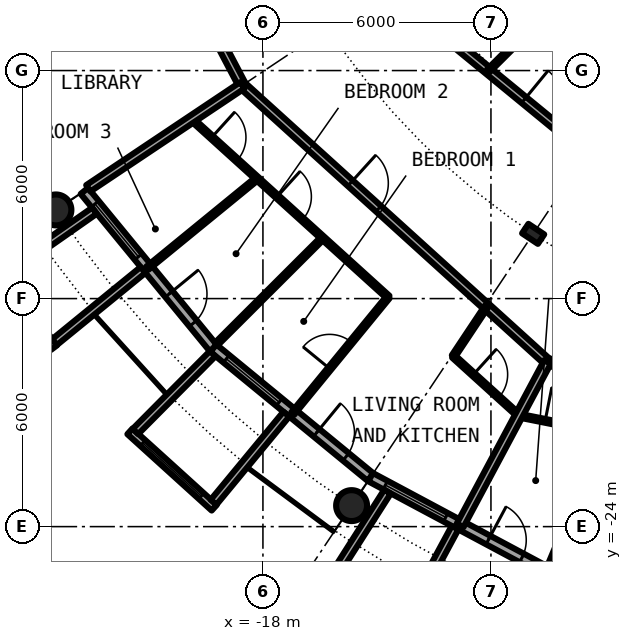
"""IFC4 building model, lengths in metres.
Left out: names, types, materials, properties, quantities, classifications, styles, units other than length and angle.
Written with IfcOpenShell. Run it as: python <this file> out.ifc"""

import sys

from ifc_helpers import new_model, si_unit, direction, frame, frame_2d, origin, origin_2d, place, context, subcontext, project, spatial, rectangle, circle, hollow_circle, i_section, extrude, element, fill, save


model = new_model("IFC4")
c1 = context("Model", 3, precision=1e-05, world=origin(), true_north=direction((0.0, 1.0)))
c2 = subcontext(c1, "Body", "Model", "MODEL_VIEW")
j1 = project(units=[si_unit("LENGTHUNIT", "METRE"), si_unit("PLANEANGLEUNIT", "RADIAN")], contexts=[c1])
p1 = place(None, origin())
s1 = spatial("IfcSite", under=j1, at=p1, CompositionType="ELEMENT")
p2 = place(p1, origin())
s2 = spatial("IfcBuilding", under=s1, at=p2, CompositionType="ELEMENT")
p3 = place(p2, frame((0.0, 0.0, 151.3)))
s3 = spatial("IfcBuildingStorey", under=s2, at=p3, CompositionType="ELEMENT", Elevation=151.3)
for number, where, z_axis, x_axis in (
    (1, (-23.448, -15.667, 0.0), (0.0, 0.0, 1.0), (1.0, 0.0, 0.0)),
    (2, (-15.667, -23.448, 0.0), (0.0, 0.0, 1.0), (1.0, 0.0, 0.0)),
):
    element("IfcColumn", number, at=place(p3, frame(where, z_axis=z_axis, x_axis=x_axis)), inside=s3, PredefinedType="COLUMN", context=c2, shape_type="SweptSolid", body=[
        extrude(hollow_circle(Radius=0.406, WallThickness=0.04, at=origin_2d()), origin(), (0.0, 0.0, 1.0), 3.05),
    ])
p4 = place(p3, frame((-10.889, -16.297, 0.0), z_axis=(0.0, 0.0, 1.0), x_axis=(-0.55557023302, -0.831469612303, 0.0)))
e3 = element("IfcColumn", 3, at=p4, inside=s3, PredefinedType="COLUMN", context=c2, shape_type="SweptSolid", body=[
    extrude(i_section(OverallWidth=0.3, OverallDepth=0.5, WebThickness=0.014, FlangeThickness=0.028, FilletRadius=0.027, at=origin_2d()), origin(), (0.0, 0.0, 1.0), 3.05),
])
p5 = place(p3, frame((-22.699, -15.167, 0.0), z_axis=(0.0, 0.0, 1.0), x_axis=(0.634382322723, -0.773019449054, 0.0)))
e4 = element("IfcWall", 4, at=p5, inside=s3, PredefinedType="SOLIDWALL", context=c2, shape_type="SweptSolid", body=[
    extrude(rectangle(XDim=5.352, YDim=0.25, at=frame_2d((2.676, 0.0))), origin(), (0.0, 0.0, 1.0), 2.7),
])
p6 = place(p5, frame((0.441, 0.0, 0.3)))
e5 = element("IfcOpeningElement", 5, at=p6, cuts=e4, PredefinedType="OPENING", context=c2, shape_type="SweptSolid", body=[
    extrude(rectangle(XDim=1.8, YDim=2.1, at=frame_2d((0.9, 1.05))), frame((0.0, 0.135, 0.0), z_axis=(0.0, -1.0, 0.0), x_axis=(1.0, 0.0, 0.0)), (0.0, 0.0, 1.0), 0.27),
])
p7 = place(p5, frame((3.51, 0.0, 0.0)))
e6 = element("IfcOpeningElement", 6, at=p7, cuts=e4, PredefinedType="OPENING", context=c2, shape_type="SweptSolid", body=[
    extrude(rectangle(XDim=1.0, YDim=2.2, at=frame_2d((0.5, 1.1))), frame((0.0, 0.135, 0.0), z_axis=(0.0, -1.0, 0.0), x_axis=(1.0, 0.0, 0.0)), (0.0, 0.0, 1.0), 0.27),
])
p8 = place(p3, frame((-24.972, -17.337, -0.03), z_axis=(0.0, 0.0, 1.0), x_axis=(0.602806268067, -0.797887588059, 0.0)))
e7 = element("IfcWall", 7, at=p8, inside=s3, PredefinedType="SOLIDWALL", context=c2, shape_type="SweptSolid", body=[
    extrude(rectangle(XDim=2.447, YDim=0.2, at=frame_2d((1.223, 0.0))), origin(), (0.0, 0.0, 1.0), 2.73),
])
p9 = place(p8, frame((0.183, 0.0, 0.33)))
e8 = element("IfcOpeningElement", 8, at=p9, cuts=e7, PredefinedType="OPENING", context=c2, shape_type="SweptSolid", body=[
    extrude(circle(Radius=1.04, at=frame_2d((1.04, 1.04))), frame((0.0, 0.11, 0.0), z_axis=(0.0, -1.0, 0.0), x_axis=(1.0, 0.0, 0.0)), (0.0, 0.0, 1.0), 0.22),
])
p10 = place(p3, frame((-22.433, -15.688, -0.03), z_axis=(0.0, 0.0, 1.0), x_axis=(-0.819373043115, -0.573260687834, 0.0)))
e9 = element("IfcWall", 9, at=p10, inside=s3, PredefinedType="SOLIDWALL", context=c2, shape_type="SweptSolid", body=[
    extrude(rectangle(XDim=2.925, YDim=0.2, at=frame_2d((1.463, 0.0))), origin(), (0.0, 0.0, 1.0), 2.73),
])
p11 = place(p3, frame((-21.155, -17.246, -0.03), z_axis=(0.0, 0.0, 1.0), x_axis=(-0.775179004516, -0.631741648902, 0.0)))
e10 = element("IfcWall", 10, at=p11, inside=s3, PredefinedType="SOLIDWALL", context=c2, shape_type="SweptSolid", body=[
    extrude(rectangle(XDim=3.006, YDim=0.2, at=frame_2d((1.503, 0.0))), origin(), (0.0, 0.0, 1.0), 2.73),
])
p12 = place(p3, frame((-19.304, -19.304, 0.0), z_axis=(0.0, 0.0, 1.0), x_axis=(0.773019449054, -0.634382322723, 0.0)))
e11 = element("IfcWall", 11, at=p12, inside=s3, PredefinedType="SOLIDWALL", context=c2, shape_type="SweptSolid", body=[
    extrude(rectangle(XDim=5.352, YDim=0.25, at=frame_2d((2.676, 0.0))), origin(), (0.0, 0.0, 1.0), 2.7),
])
p13 = place(p12, frame((0.441, 0.0, 0.3)))
e12 = element("IfcOpeningElement", 12, at=p13, cuts=e11, PredefinedType="OPENING", context=c2, shape_type="SweptSolid", body=[
    extrude(rectangle(XDim=1.8, YDim=2.1, at=frame_2d((0.9, 1.05))), frame((0.0, 0.135, 0.0), z_axis=(0.0, -1.0, 0.0), x_axis=(1.0, 0.0, 0.0)), (0.0, 0.0, 1.0), 0.27),
])
p14 = place(p12, frame((3.51, 0.0, 0.0)))
e13 = element("IfcOpeningElement", 13, at=p14, cuts=e11, PredefinedType="OPENING", context=c2, shape_type="SweptSolid", body=[
    extrude(rectangle(XDim=1.0, YDim=2.2, at=frame_2d((0.5, 1.1))), frame((0.0, 0.135, 0.0), z_axis=(0.0, -1.0, 0.0), x_axis=(1.0, 0.0, 0.0)), (0.0, 0.0, 1.0), 0.27),
])
p15 = place(p3, frame((-21.5, -21.493, -0.03), z_axis=(0.0, 0.0, 1.0), x_axis=(0.740998365753, -0.671506829416, 0.0)))
e14 = element("IfcWall", 14, at=p15, inside=s3, PredefinedType="SOLIDWALL", context=c2, shape_type="SweptSolid", body=[
    extrude(rectangle(XDim=2.993, YDim=0.2, at=frame_2d((1.497, 0.0))), origin(), (0.0, 0.0, 1.0), 2.73),
])
p16 = place(p15, frame((0.457, 0.0, 0.33)))
e15 = element("IfcOpeningElement", 15, at=p16, cuts=e14, PredefinedType="OPENING", context=c2, shape_type="SweptSolid", body=[
    extrude(circle(Radius=1.04, at=frame_2d((1.04, 1.04))), frame((0.0, 0.11, 0.0), z_axis=(0.0, -1.0, 0.0), x_axis=(1.0, 0.0, 0.0)), (0.0, 0.0, 1.0), 0.22),
])
p17 = place(p3, frame((-19.323, -19.45, -0.03), z_axis=(0.0, 0.0, 1.0), x_axis=(-0.704476739375, -0.709727076896, 0.0)))
e16 = element("IfcWall", 16, at=p17, inside=s3, PredefinedType="SOLIDWALL", context=c2, shape_type="SweptSolid", body=[
    extrude(rectangle(XDim=2.883, YDim=0.2, at=frame_2d((1.441, 0.0))), origin(), (0.0, 0.0, 1.0), 2.73),
])
p18 = place(p3, frame((-17.384, -21.041, -0.03), z_axis=(0.0, 0.0, 1.0), x_axis=(-0.63709551667, -0.770784861449, 0.0)))
e17 = element("IfcWall", 17, at=p18, inside=s3, PredefinedType="SOLIDWALL", context=c2, shape_type="SweptSolid", body=[
    extrude(rectangle(XDim=3.006, YDim=0.2, at=frame_2d((1.503, 0.0))), origin(), (0.0, 0.0, 1.0), 2.73),
])
p19 = place(p3, frame((-15.167, -22.699, 0.0), z_axis=(0.0, 0.0, 1.0), x_axis=(0.881915646801, -0.471407246368, 0.0)))
e18 = element("IfcWall", 18, at=p19, inside=s3, PredefinedType="SOLIDWALL", context=c2, shape_type="SweptSolid", body=[
    extrude(rectangle(XDim=5.352, YDim=0.25, at=frame_2d((2.676, 0.0))), origin(), (0.0, 0.0, 1.0), 2.7),
])
p20 = place(p19, frame((0.441, 0.0, 0.3)))
e19 = element("IfcOpeningElement", 19, at=p20, cuts=e18, PredefinedType="OPENING", context=c2, shape_type="SweptSolid", body=[
    extrude(rectangle(XDim=1.8, YDim=2.1, at=frame_2d((0.9, 1.05))), frame((0.0, 0.135, 0.0), z_axis=(0.0, -1.0, 0.0), x_axis=(1.0, 0.0, 0.0)), (0.0, 0.0, 1.0), 0.27),
])
p21 = place(p19, frame((3.51, 0.0, 0.0)))
e20 = element("IfcOpeningElement", 20, at=p21, cuts=e18, PredefinedType="OPENING", context=c2, shape_type="SweptSolid", body=[
    extrude(rectangle(XDim=1.0, YDim=2.2, at=frame_2d((0.5, 1.1))), frame((0.0, 0.135, 0.0), z_axis=(0.0, -1.0, 0.0), x_axis=(1.0, 0.0, 0.0)), (0.0, 0.0, 1.0), 0.27),
])
p22 = place(p3, frame((-14.722, -23.079, -0.03), z_axis=(0.0, 0.0, 1.0), x_axis=(-0.537572179146, -0.843217737129, 0.0)))
e21 = element("IfcWall", 21, at=p22, inside=s3, PredefinedType="SOLIDWALL", context=c2, shape_type="SweptSolid", body=[
    extrude(rectangle(XDim=2.924, YDim=0.2, at=frame_2d((1.462, 0.0))), origin(), (0.0, 0.0, 1.0), 2.73),
])
p23 = place(p3, frame((-12.945, -24.029, -0.03), z_axis=(0.0, 0.0, 1.0), x_axis=(-0.474424310775, -0.88029629861, 0.0)))
e22 = element("IfcWall", 22, at=p23, inside=s3, PredefinedType="SOLIDWALL", context=c2, shape_type="SweptSolid", body=[
    extrude(rectangle(XDim=3.006, YDim=0.2, at=frame_2d((1.503, 0.0))), origin(), (0.0, 0.0, 1.0), 2.73),
])
p24 = place(p3, frame((-19.869, -13.284, 0.0), z_axis=(0.0, 0.0, 1.0), x_axis=(0.741104058203, -0.67139018083, 0.0)))
e23 = element("IfcWall", 23, at=p24, inside=s3, PredefinedType="PARTITIONING", context=c2, shape_type="SweptSolid", body=[
    extrude(rectangle(XDim=6.969, YDim=0.1, at=frame_2d((3.484, 0.0))), origin(), (0.0, 0.0, 1.0), 2.7),
])
p25 = place(p24, frame((3.028, 0.0, 0.0)))
e24 = element("IfcOpeningElement", 24, at=p25, cuts=e23, PredefinedType="OPENING", context=c2, shape_type="SweptSolid", body=[
    extrude(rectangle(XDim=0.9, YDim=2.3, at=frame_2d((0.45, 1.15))), frame((0.0, 0.06, 0.0), z_axis=(0.0, -1.0, 0.0), x_axis=(1.0, 0.0, 0.0)), (0.0, 0.0, 1.0), 0.12),
])
p26 = place(p24, frame((0.705, 0.0, 0.0)))
e25 = element("IfcOpeningElement", 25, at=p26, cuts=e23, PredefinedType="OPENING", context=c2, shape_type="SweptSolid", body=[
    extrude(rectangle(XDim=0.9, YDim=2.3, at=frame_2d((0.45, 1.15))), frame((0.0, 0.06, 0.0), z_axis=(0.0, -1.0, 0.0), x_axis=(1.0, 0.0, 0.0)), (0.0, 0.0, 1.0), 0.12),
])
p27 = place(p3, frame((-12.988, -19.518, 0.0), z_axis=(0.0, 0.0, 1.0), x_axis=(0.741132356378, -0.671358942988, 0.0)))
e26 = element("IfcWall", 26, at=p27, inside=s3, PredefinedType="PARTITIONING", context=c2, shape_type="SweptSolid", body=[
    extrude(rectangle(XDim=2.323, YDim=0.1, at=frame_2d((1.162, 0.0))), origin(), (0.0, 0.0, 1.0), 2.7),
])
p28 = place(p27, frame((0.712, 0.0, 0.0)))
e27 = element("IfcOpeningElement", 27, at=p28, cuts=e26, PredefinedType="OPENING", context=c2, shape_type="SweptSolid", body=[
    extrude(rectangle(XDim=0.9, YDim=2.3, at=frame_2d((0.45, 1.15))), frame((0.0, 0.06, 0.0), z_axis=(0.0, -1.0, 0.0), x_axis=(1.0, 0.0, 0.0)), (0.0, 0.0, 1.0), 0.12),
])
p29 = place(p3, frame((-11.264, -21.08, 0.0), z_axis=(0.0, 0.0, 1.0), x_axis=(0.980795304313, -0.195039921651, 0.0)))
e28 = element("IfcWall", 28, at=p29, inside=s3, PredefinedType="PARTITIONING", context=c2, shape_type="SweptSolid", body=[
    extrude(rectangle(XDim=6.937, YDim=0.1, at=frame_2d((3.469, 0.0))), origin(), (0.0, 0.0, 1.0), 2.7),
])
p30 = place(p29, frame((3.016, 0.0, 0.0)))
e29 = element("IfcOpeningElement", 29, at=p30, cuts=e28, PredefinedType="OPENING", context=c2, shape_type="SweptSolid", body=[
    extrude(rectangle(XDim=0.9, YDim=2.3, at=frame_2d((0.45, 1.15))), frame((0.0, 0.06, 0.0), z_axis=(0.0, -1.0, 0.0), x_axis=(1.0, 0.0, 0.0)), (0.0, 0.0, 1.0), 0.12),
])
p31 = place(p29, frame((0.704, 0.0, 0.0)))
e30 = element("IfcOpeningElement", 30, at=p31, cuts=e28, PredefinedType="OPENING", context=c2, shape_type="SweptSolid", body=[
    extrude(rectangle(XDim=0.9, YDim=2.3, at=frame_2d((0.45, 1.15))), frame((0.0, 0.06, 0.0), z_axis=(0.0, -1.0, 0.0), x_axis=(1.0, 0.0, 0.0)), (0.0, 0.0, 1.0), 0.12),
])
p32 = place(p3, frame((-19.307, -10.935, 0.0), z_axis=(0.0, 0.0, 1.0), x_axis=(0.465605550524, -0.884992356646, 0.0)))
e31 = element("IfcWall", 31, at=p32, inside=s3, PredefinedType="PARTITIONING", context=c2, shape_type="SweptSolid", body=[
    extrude(rectangle(XDim=1.643, YDim=0.2, at=frame_2d((0.821, 0.0))), origin(), (0.0, 0.0, 1.0), 2.7),
])
p33 = place(p3, frame((-18.542, -12.389, 0.0), z_axis=(0.0, 0.0, 1.0), x_axis=(0.740979597636, -0.671527539188, 0.0)))
e32 = element("IfcWall", 32, at=p33, inside=s3, PredefinedType="PARTITIONING", context=c2, shape_type="SweptSolid", body=[
    extrude(rectangle(XDim=10.841, YDim=0.2, at=frame_2d((5.42, 0.0))), origin(), (0.0, 0.0, 1.0), 2.7),
])
p34 = place(p33, frame((3.835, 0.0, 0.0)))
e33 = element("IfcOpeningElement", 33, at=p34, cuts=e32, PredefinedType="OPENING", context=c2, shape_type="SweptSolid", body=[
    extrude(rectangle(XDim=1.0, YDim=2.3, at=frame_2d((0.5, 1.15))), frame((0.0, 0.11, 0.0), z_axis=(0.0, -1.0, 0.0), x_axis=(1.0, 0.0, 0.0)), (0.0, 0.0, 1.0), 0.22),
])
p35 = place(p3, frame((-10.512, -19.667, 0.0), z_axis=(0.0, 0.0, 1.0), x_axis=(0.980780341017, -0.195115152343, 0.0)))
e34 = element("IfcWall", 34, at=p35, inside=s3, PredefinedType="PARTITIONING", context=c2, shape_type="SweptSolid", body=[
    extrude(rectangle(XDim=12.947, YDim=0.2, at=frame_2d((6.473, 0.0))), origin(), (0.0, 0.0, 1.0), 2.7),
])
p36 = place(p35, frame((4.894, 0.0, 0.0)))
e35 = element("IfcOpeningElement", 35, at=p36, cuts=e34, PredefinedType="OPENING", context=c2, shape_type="SweptSolid", body=[
    extrude(rectangle(XDim=1.0, YDim=2.3, at=frame_2d((0.5, 1.15))), frame((0.0, 0.11, 0.0), z_axis=(0.0, -1.0, 0.0), x_axis=(1.0, 0.0, 0.0)), (0.0, 0.0, 1.0), 0.22),
])
p37 = place(p3, frame((-14.717, -9.834, 0.0), z_axis=(0.0, 0.0, 1.0), x_axis=(0.773034536097, -0.634363938131, 0.0)))
e36 = element("IfcWall", 36, at=p37, inside=s3, PredefinedType="PARTITIONING", context=c2, shape_type="SweptSolid", body=[
    extrude(rectangle(XDim=10.277, YDim=0.2, at=frame_2d((5.138, 0.0))), origin(), (0.0, 0.0, 1.0), 2.7),
])
p38 = place(p37, frame((4.638, 0.0, 0.0)))
e37 = element("IfcOpeningElement", 37, at=p38, cuts=e36, PredefinedType="OPENING", context=c2, shape_type="SweptSolid", body=[
    extrude(rectangle(XDim=1.0, YDim=2.3, at=frame_2d((0.5, 1.15))), frame((0.0, 0.11, 0.0), z_axis=(0.0, -1.0, 0.0), x_axis=(1.0, 0.0, 0.0)), (0.0, 0.0, 1.0), 0.22),
])
p39 = place(p3, frame((-22.595, -15.098, 0.0), z_axis=(0.0, 0.0, 1.0), x_axis=(0.831387096605, 0.55569370664, 0.0)))
e38 = element("IfcWall", 38, at=p39, inside=s3, PredefinedType="PARTITIONING", context=c2, shape_type="SweptSolid", body=[
    extrude(rectangle(XDim=4.875, YDim=0.2, at=frame_2d((2.438, 0.0))), origin(), (0.0, 0.0, 1.0), 2.7),
])
p40 = place(p3, frame((-21.04, -17.199, 0.0), z_axis=(0.0, 0.0, 1.0), x_axis=(0.774321581607, 0.63279229472, 0.0)))
e39 = element("IfcWall", 39, at=p40, inside=s3, PredefinedType="PARTITIONING", context=c2, shape_type="SweptSolid", body=[
    extrude(rectangle(XDim=3.731, YDim=0.1, at=frame_2d((1.866, 0.0))), origin(), (0.0, 0.0, 1.0), 2.7),
])
p41 = place(p3, frame((-19.231, -19.2, 0.0), z_axis=(0.0, 0.0, 1.0), x_axis=(0.707722727509, 0.706490297858, 0.0)))
e40 = element("IfcWall", 40, at=p41, inside=s3, PredefinedType="PARTITIONING", context=c2, shape_type="SweptSolid", body=[
    extrude(rectangle(XDim=3.962, YDim=0.1, at=frame_2d((1.981, 0.0))), origin(), (0.0, 0.0, 1.0), 2.7),
])
p42 = place(p3, frame((-17.216, -21.026, 0.0), z_axis=(0.0, 0.0, 1.0), x_axis=(0.633590098448, 0.773668913133, 0.0)))
e41 = element("IfcWall", 41, at=p42, inside=s3, PredefinedType="PARTITIONING", context=c2, shape_type="SweptSolid", body=[
    extrude(rectangle(XDim=3.962, YDim=0.1, at=frame_2d((1.981, 0.0))), origin(), (0.0, 0.0, 1.0), 2.7),
])
p43 = place(p42, frame((1.531, 0.0, 0.0)))
e42 = element("IfcOpeningElement", 42, at=p43, cuts=e41, PredefinedType="OPENING", context=c2, shape_type="SweptSolid", body=[
    extrude(rectangle(XDim=0.9, YDim=2.3, at=frame_2d((0.45, 1.15))), frame((0.0, 0.06, 0.0), z_axis=(0.0, -1.0, 0.0), x_axis=(1.0, 0.0, 0.0)), (0.0, 0.0, 1.0), 0.12),
])
p44 = place(p3, frame((-12.988, -19.518, 0.0), z_axis=(0.0, 0.0, 1.0), x_axis=(0.554125989098, 0.832432813028, 0.0)))
e43 = element("IfcWall", 43, at=p44, inside=s3, PredefinedType="PARTITIONING", context=c2, shape_type="SweptSolid", body=[
    extrude(rectangle(XDim=1.57, YDim=0.1, at=frame_2d((0.785, 0.0))), origin(), (0.0, 0.0, 1.0), 2.7),
])
p45 = place(p3, frame((-12.81, -23.966, 0.0), z_axis=(0.0, 0.0, 1.0), x_axis=(0.471427642527, 0.881904744211, 0.0)))
e44 = element("IfcWall", 44, at=p45, inside=s3, PredefinedType="PARTITIONING", context=c2, shape_type="SweptSolid", body=[
    extrude(rectangle(XDim=4.875, YDim=0.2, at=frame_2d((2.438, 0.0))), origin(), (0.0, 0.0, 1.0), 2.7),
])
p46 = place(p3, frame((-12.069, -12.007, 0.0), z_axis=(0.0, 0.0, 1.0), x_axis=(0.708822693149, 0.705386695138, 0.0)))
e45 = element("IfcWall", 45, at=p46, inside=s3, PredefinedType="PARTITIONING", context=c2, shape_type="SweptSolid", body=[
    extrude(rectangle(XDim=4.121, YDim=0.1, at=frame_2d((2.061, 0.0))), origin(), (0.0, 0.0, 1.0), 2.7),
])
p47 = place(p46, frame((1.611, 0.0, 0.0)))
e46 = element("IfcOpeningElement", 46, at=p47, cuts=e45, PredefinedType="OPENING", context=c2, shape_type="SweptSolid", body=[
    extrude(rectangle(XDim=0.9, YDim=2.3, at=frame_2d((0.45, 1.15))), frame((0.0, 0.06, 0.0), z_axis=(0.0, -1.0, 0.0), x_axis=(1.0, 0.0, 0.0)), (0.0, 0.0, 1.0), 0.12),
])
p48 = place(p3, frame((-10.479, -25.073, 0.0), z_axis=(0.0, 0.0, 1.0), x_axis=(0.385572005139, 0.922677749192, 0.0)))
e47 = element("IfcWall", 47, at=p48, inside=s3, PredefinedType="PARTITIONING", context=c2, shape_type="SweptSolid", body=[
    extrude(rectangle(XDim=3.841, YDim=0.1, at=frame_2d((1.92, 0.0))), origin(), (0.0, 0.0, 1.0), 2.7),
])
p49 = place(p6, origin())
e48 = element("IfcWindow", 48, at=p49, inside=s3, PartitioningType="SINGLE_PANEL", PredefinedType="WINDOW", context=c2, shape_type="SweptSolid", body=[
    extrude(rectangle(XDim=1.8, YDim=2.1, at=frame_2d((0.9, 1.05))), frame((0.0, 0.03, 0.0), z_axis=(0.0, -1.0, 0.0), x_axis=(1.0, 0.0, 0.0)), (0.0, 0.0, 1.0), 0.06),
])
fill(e5, e48)
p50 = place(p7, origin())
e49 = element("IfcDoor", 49, at=p50, inside=s3, OperationType="SINGLE_SWING_LEFT", PredefinedType="DOOR", context=c2, shape_type="SweptSolid", body=[
    extrude(rectangle(XDim=1.0, YDim=2.2, at=frame_2d((0.5, 1.1))), frame((0.0, 0.025, 0.0), z_axis=(0.0, -1.0, 0.0), x_axis=(1.0, 0.0, 0.0)), (0.0, 0.0, 1.0), 0.05),
])
fill(e6, e49)
p51 = place(p13, origin())
e50 = element("IfcWindow", 50, at=p51, inside=s3, PartitioningType="SINGLE_PANEL", PredefinedType="WINDOW", context=c2, shape_type="SweptSolid", body=[
    extrude(rectangle(XDim=1.8, YDim=2.1, at=frame_2d((0.9, 1.05))), frame((0.0, 0.03, 0.0), z_axis=(0.0, -1.0, 0.0), x_axis=(1.0, 0.0, 0.0)), (0.0, 0.0, 1.0), 0.06),
])
fill(e12, e50)
p52 = place(p16, origin())
e51 = element("IfcWindow", 51, at=p52, inside=s3, PartitioningType="SINGLE_PANEL", PredefinedType="WINDOW", context=c2, shape_type="SweptSolid", body=[
    extrude(circle(Radius=1.04, at=frame_2d((1.04, 1.04))), frame((0.0, 0.03, 0.0), z_axis=(0.0, -1.0, 0.0), x_axis=(1.0, 0.0, 0.0)), (0.0, 0.0, 1.0), 0.06),
])
fill(e15, e51)
p53 = place(p14, origin())
e52 = element("IfcDoor", 52, at=p53, inside=s3, OperationType="SINGLE_SWING_LEFT", PredefinedType="DOOR", context=c2, shape_type="SweptSolid", body=[
    extrude(rectangle(XDim=1.0, YDim=2.2, at=frame_2d((0.5, 1.1))), frame((0.0, 0.025, 0.0), z_axis=(0.0, -1.0, 0.0), x_axis=(1.0, 0.0, 0.0)), (0.0, 0.0, 1.0), 0.05),
])
fill(e13, e52)
p54 = place(p20, origin())
e53 = element("IfcWindow", 53, at=p54, inside=s3, PartitioningType="SINGLE_PANEL", PredefinedType="WINDOW", context=c2, shape_type="SweptSolid", body=[
    extrude(rectangle(XDim=1.8, YDim=2.1, at=frame_2d((0.9, 1.05))), frame((0.0, 0.03, 0.0), z_axis=(0.0, -1.0, 0.0), x_axis=(1.0, 0.0, 0.0)), (0.0, 0.0, 1.0), 0.06),
])
fill(e19, e53)
p55 = place(p21, origin())
e54 = element("IfcDoor", 54, at=p55, inside=s3, OperationType="SINGLE_SWING_LEFT", PredefinedType="DOOR", context=c2, shape_type="SweptSolid", body=[
    extrude(rectangle(XDim=1.0, YDim=2.2, at=frame_2d((0.5, 1.1))), frame((0.0, 0.025, 0.0), z_axis=(0.0, -1.0, 0.0), x_axis=(1.0, 0.0, 0.0)), (0.0, 0.0, 1.0), 0.05),
])
fill(e20, e54)
p56 = place(p34, origin())
e55 = element("IfcDoor", 55, at=p56, inside=s3, OperationType="SINGLE_SWING_LEFT", PredefinedType="DOOR", context=c2, shape_type="SweptSolid", body=[
    extrude(rectangle(XDim=1.0, YDim=2.3, at=frame_2d((0.5, 1.15))), frame((0.0, 0.025, 0.0), z_axis=(0.0, -1.0, 0.0), x_axis=(1.0, 0.0, 0.0)), (0.0, 0.0, 1.0), 0.05),
])
fill(e33, e55)
p57 = place(p28, origin())
e56 = element("IfcDoor", 56, at=p57, inside=s3, OperationType="SINGLE_SWING_RIGHT", PredefinedType="DOOR", context=c2, shape_type="SweptSolid", body=[
    extrude(rectangle(XDim=0.9, YDim=2.3, at=frame_2d((0.45, 1.15))), frame((0.0, 0.025, 0.0), z_axis=(0.0, -1.0, 0.0), x_axis=(1.0, 0.0, 0.0)), (0.0, 0.0, 1.0), 0.05),
])
fill(e27, e56)
p58 = place(p43, origin())
e57 = element("IfcDoor", 57, at=p58, inside=s3, OperationType="SINGLE_SWING_RIGHT", PredefinedType="DOOR", context=c2, shape_type="SweptSolid", body=[
    extrude(rectangle(XDim=0.9, YDim=2.3, at=frame_2d((0.45, 1.15))), frame((0.0, 0.025, 0.0), z_axis=(0.0, -1.0, 0.0), x_axis=(1.0, 0.0, 0.0)), (0.0, 0.0, 1.0), 0.05),
])
fill(e42, e57)
p59 = place(p25, origin())
e58 = element("IfcDoor", 58, at=p59, inside=s3, OperationType="SINGLE_SWING_LEFT", PredefinedType="DOOR", context=c2, shape_type="SweptSolid", body=[
    extrude(rectangle(XDim=0.9, YDim=2.3, at=frame_2d((0.45, 1.15))), frame((0.0, 0.025, 0.0), z_axis=(0.0, -1.0, 0.0), x_axis=(1.0, 0.0, 0.0)), (0.0, 0.0, 1.0), 0.05),
])
fill(e24, e58)
p60 = place(p26, origin())
e59 = element("IfcDoor", 59, at=p60, inside=s3, OperationType="SINGLE_SWING_LEFT", PredefinedType="DOOR", context=c2, shape_type="SweptSolid", body=[
    extrude(rectangle(XDim=0.9, YDim=2.3, at=frame_2d((0.45, 1.15))), frame((0.0, 0.025, 0.0), z_axis=(0.0, -1.0, 0.0), x_axis=(1.0, 0.0, 0.0)), (0.0, 0.0, 1.0), 0.05),
])
fill(e25, e59)
p61 = place(p31, origin())
e60 = element("IfcDoor", 60, at=p61, inside=s3, OperationType="SINGLE_SWING_LEFT", PredefinedType="DOOR", context=c2, shape_type="SweptSolid", body=[
    extrude(rectangle(XDim=0.9, YDim=2.3, at=frame_2d((0.45, 1.15))), frame((0.0, 0.025, 0.0), z_axis=(0.0, -1.0, 0.0), x_axis=(1.0, 0.0, 0.0)), (0.0, 0.0, 1.0), 0.05),
])
fill(e30, e60)
p62 = place(p38, origin())
e61 = element("IfcDoor", 61, at=p62, inside=s3, OperationType="SINGLE_SWING_LEFT", PredefinedType="DOOR", context=c2, shape_type="SweptSolid", body=[
    extrude(rectangle(XDim=1.0, YDim=2.3, at=frame_2d((0.5, 1.15))), frame((0.0, 0.025, 0.0), z_axis=(0.0, -1.0, 0.0), x_axis=(1.0, 0.0, 0.0)), (0.0, 0.0, 1.0), 0.05),
])
fill(e37, e61)
save(model, sys.argv[1])
